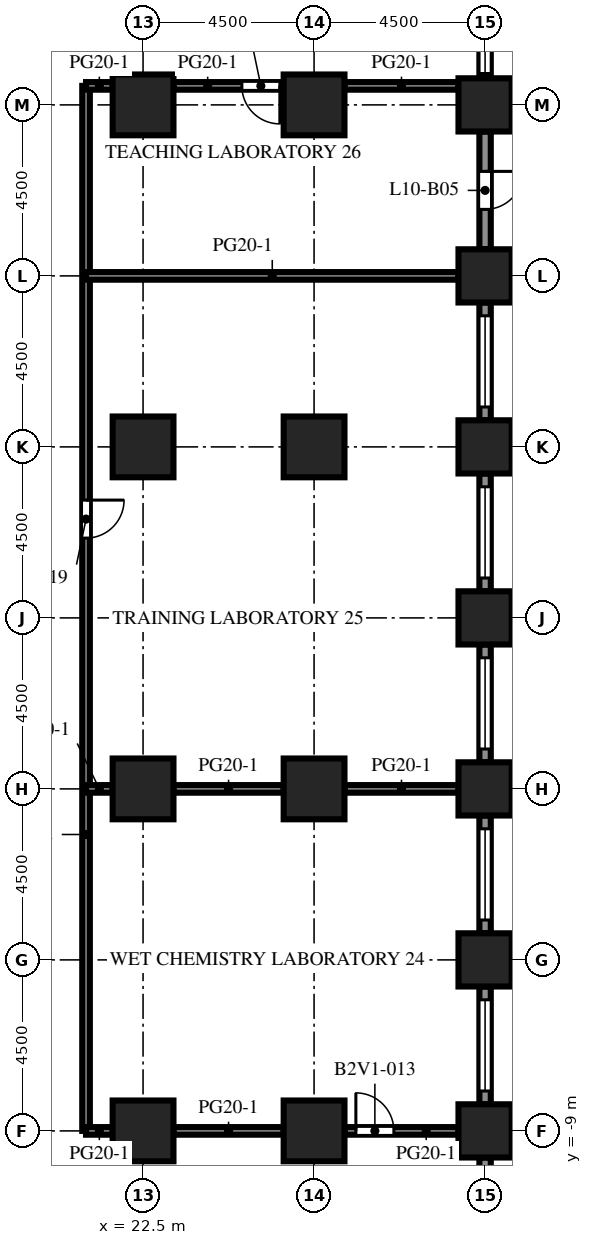
"""IFC4 building model, lengths in metres.
Left out: names, types, materials, properties, quantities, classifications, styles, units other than length and angle.
Written with IfcOpenShell. Run it as: python <this file> out.ifc"""

import sys

from ifc_helpers import new_model, si_unit, direction, frame, frame_2d, origin, origin_2d, place, context, subcontext, project, spatial, rectangle, extrude, element, fill, save


model = new_model("IFC4")
c1 = context("Model", 3, precision=1e-05, world=origin(), true_north=direction((0.0, 1.0)))
c2 = subcontext(c1, "Body", "Model", "MODEL_VIEW")
j1 = project(units=[si_unit("LENGTHUNIT", "METRE"), si_unit("PLANEANGLEUNIT", "RADIAN")], contexts=[c1])
p1 = place(None, origin())
s1 = spatial("IfcSite", under=j1, at=p1, CompositionType="ELEMENT")
p2 = place(p1, origin())
s2 = spatial("IfcBuilding", under=s1, at=p2, CompositionType="ELEMENT")
p3 = place(p2, frame((0.0, 0.0, 46.0)))
s3 = spatial("IfcBuildingStorey", under=s2, at=p3, CompositionType="ELEMENT", Elevation=46.0)
for number, where, z_axis, x_axis in (
    (1, (31.5, -9.0, 0.0), (0.0, 0.0, 1.0), (1.0, 0.0, 0.0)),
    (2, (31.5, -4.5, 0.0), (0.0, 0.0, 1.0), (1.0, 0.0, 0.0)),
    (3, (31.5, 0.0, 0.0), (0.0, 0.0, 1.0), (1.0, 0.0, 0.0)),
    (4, (31.5, 4.5, 0.0), (0.0, 0.0, 1.0), (1.0, 0.0, 0.0)),
    (5, (31.5, 9.0, 0.0), (0.0, 0.0, 1.0), (1.0, 0.0, 0.0)),
    (6, (31.5, 13.5, 0.0), (0.0, 0.0, 1.0), (1.0, 0.0, 0.0)),
    (7, (31.5, 18.0, 0.0), (0.0, 0.0, 1.0), (1.0, 0.0, 0.0)),
):
    element("IfcColumn", number, at=place(p3, frame(where, z_axis=z_axis, x_axis=x_axis)), inside=s3, PredefinedType="COLUMN", context=c2, shape_type="SweptSolid", body=[
        extrude(rectangle(XDim=1.4, YDim=1.4, at=origin_2d()), origin(), (0.0, 0.0, 1.0), 4.1),
    ])
for number, where, z_axis, x_axis in (
    (8, (22.5, -9.0, 0.0), (0.0, 0.0, 1.0), (1.0, 0.0, 0.0)),
    (9, (22.5, 0.0, 0.0), (0.0, 0.0, 1.0), (1.0, 0.0, 0.0)),
    (10, (22.5, 9.0, 0.0), (0.0, 0.0, 1.0), (1.0, 0.0, 0.0)),
    (11, (22.5, 18.0, 0.0), (0.0, 0.0, 1.0), (1.0, 0.0, 0.0)),
    (12, (27.0, -9.0, 0.0), (0.0, 0.0, 1.0), (1.0, 0.0, 0.0)),
    (13, (27.0, 0.0, 0.0), (0.0, 0.0, 1.0), (1.0, 0.0, 0.0)),
    (14, (27.0, 9.0, 0.0), (0.0, 0.0, 1.0), (1.0, 0.0, 0.0)),
    (15, (27.0, 18.0, 0.0), (0.0, 0.0, 1.0), (1.0, 0.0, 0.0)),
):
    element("IfcColumn", number, at=place(p3, frame(where, z_axis=z_axis, x_axis=x_axis)), inside=s3, PredefinedType="COLUMN", context=c2, shape_type="SweptSolid", body=[
        extrude(rectangle(XDim=1.6, YDim=1.6, at=origin_2d()), origin(), (0.0, 0.0, 1.0), 4.1),
    ])
p4 = place(p3, frame((31.5, -9.7, 0.0), z_axis=(0.0, 0.0, 1.0), x_axis=(0.0, -1.0, 0.0)))
e16 = element("IfcWall", 16, at=p4, inside=s3, PredefinedType="SOLIDWALL", context=c2, shape_type="SweptSolid", body=[
    extrude(rectangle(XDim=3.1, YDim=0.3, at=frame_2d((1.55, 0.0))), origin(), (0.0, 0.0, 1.0), 2.75),
])
p5 = place(p4, frame((0.475, 0.0, 0.8)))
e17 = element("IfcOpeningElement", 17, at=p5, cuts=e16, PredefinedType="OPENING", context=c2, shape_type="SweptSolid", body=[
    extrude(rectangle(XDim=1.2, YDim=1.7, at=frame_2d((0.6, 0.85))), frame((0.0, 0.16, 0.0), z_axis=(0.0, -1.0, 0.0), x_axis=(1.0, 0.0, 0.0)), (0.0, 0.0, 1.0), 0.32),
])
p6 = place(p3, frame((31.5, -5.2, 0.0), z_axis=(0.0, 0.0, 1.0), x_axis=(0.0, -1.0, 0.0)))
e18 = element("IfcWall", 18, at=p6, inside=s3, PredefinedType="SOLIDWALL", context=c2, shape_type="SweptSolid", body=[
    extrude(rectangle(XDim=3.1, YDim=0.3, at=frame_2d((1.55, 0.0))), origin(), (0.0, 0.0, 1.0), 2.75),
])
p7 = place(p6, frame((0.35, 0.0, 0.8)))
e19 = element("IfcOpeningElement", 19, at=p7, cuts=e18, PredefinedType="OPENING", context=c2, shape_type="SweptSolid", body=[
    extrude(rectangle(XDim=2.4, YDim=1.7, at=frame_2d((1.2, 0.85))), frame((0.0, 0.16, 0.0), z_axis=(0.0, -1.0, 0.0), x_axis=(1.0, 0.0, 0.0)), (0.0, 0.0, 1.0), 0.32),
])
p8 = place(p3, frame((31.5, -0.7, 0.0), z_axis=(0.0, 0.0, 1.0), x_axis=(0.0, -1.0, 0.0)))
e20 = element("IfcWall", 20, at=p8, inside=s3, PredefinedType="SOLIDWALL", context=c2, shape_type="SweptSolid", body=[
    extrude(rectangle(XDim=3.1, YDim=0.3, at=frame_2d((1.55, 0.0))), origin(), (0.0, 0.0, 1.0), 2.75),
])
p9 = place(p8, frame((0.35, 0.0, 0.8)))
e21 = element("IfcOpeningElement", 21, at=p9, cuts=e20, PredefinedType="OPENING", context=c2, shape_type="SweptSolid", body=[
    extrude(rectangle(XDim=2.4, YDim=1.7, at=frame_2d((1.2, 0.85))), frame((0.0, 0.16, 0.0), z_axis=(0.0, -1.0, 0.0), x_axis=(1.0, 0.0, 0.0)), (0.0, 0.0, 1.0), 0.32),
])
p10 = place(p3, frame((31.5, 3.8, 0.0), z_axis=(0.0, 0.0, 1.0), x_axis=(0.0, -1.0, 0.0)))
e22 = element("IfcWall", 22, at=p10, inside=s3, PredefinedType="SOLIDWALL", context=c2, shape_type="SweptSolid", body=[
    extrude(rectangle(XDim=3.1, YDim=0.3, at=frame_2d((1.55, 0.0))), origin(), (0.0, 0.0, 1.0), 2.75),
])
p11 = place(p10, frame((0.35, 0.0, 0.8)))
e23 = element("IfcOpeningElement", 23, at=p11, cuts=e22, PredefinedType="OPENING", context=c2, shape_type="SweptSolid", body=[
    extrude(rectangle(XDim=2.4, YDim=1.7, at=frame_2d((1.2, 0.85))), frame((0.0, 0.16, 0.0), z_axis=(0.0, -1.0, 0.0), x_axis=(1.0, 0.0, 0.0)), (0.0, 0.0, 1.0), 0.32),
])
p12 = place(p3, frame((31.5, 8.3, 0.0), z_axis=(0.0, 0.0, 1.0), x_axis=(0.0, -1.0, 0.0)))
e24 = element("IfcWall", 24, at=p12, inside=s3, PredefinedType="SOLIDWALL", context=c2, shape_type="SweptSolid", body=[
    extrude(rectangle(XDim=3.1, YDim=0.3, at=frame_2d((1.55, 0.0))), origin(), (0.0, 0.0, 1.0), 2.75),
])
p13 = place(p12, frame((0.35, 0.0, 0.8)))
e25 = element("IfcOpeningElement", 25, at=p13, cuts=e24, PredefinedType="OPENING", context=c2, shape_type="SweptSolid", body=[
    extrude(rectangle(XDim=2.4, YDim=1.7, at=frame_2d((1.2, 0.85))), frame((0.0, 0.16, 0.0), z_axis=(0.0, -1.0, 0.0), x_axis=(1.0, 0.0, 0.0)), (0.0, 0.0, 1.0), 0.32),
])
p14 = place(p3, frame((31.5, 12.8, 0.0), z_axis=(0.0, 0.0, 1.0), x_axis=(0.0, -1.0, 0.0)))
e26 = element("IfcWall", 26, at=p14, inside=s3, PredefinedType="SOLIDWALL", context=c2, shape_type="SweptSolid", body=[
    extrude(rectangle(XDim=3.1, YDim=0.3, at=frame_2d((1.55, 0.0))), origin(), (0.0, 0.0, 1.0), 2.75),
])
p15 = place(p14, frame((0.35, 0.0, 0.8)))
e27 = element("IfcOpeningElement", 27, at=p15, cuts=e26, PredefinedType="OPENING", context=c2, shape_type="SweptSolid", body=[
    extrude(rectangle(XDim=2.4, YDim=1.7, at=frame_2d((1.2, 0.85))), frame((0.0, 0.16, 0.0), z_axis=(0.0, -1.0, 0.0), x_axis=(1.0, 0.0, 0.0)), (0.0, 0.0, 1.0), 0.32),
])
p16 = place(p3, frame((31.5, 17.3, 0.0), z_axis=(0.0, 0.0, 1.0), x_axis=(0.0, -1.0, 0.0)))
e28 = element("IfcWall", 28, at=p16, inside=s3, PredefinedType="SOLIDWALL", context=c2, shape_type="SweptSolid", body=[
    extrude(rectangle(XDim=3.1, YDim=0.3, at=frame_2d((1.55, 0.0))), origin(), (0.0, 0.0, 1.0), 2.75),
])
p17 = place(p16, frame((1.05, 0.0, 0.0)))
e29 = element("IfcOpeningElement", 29, at=p17, cuts=e28, PredefinedType="OPENING", context=c2, shape_type="SweptSolid", body=[
    extrude(rectangle(XDim=1.0, YDim=2.2, at=frame_2d((0.5, 1.1))), frame((0.0, 0.16, 0.0), z_axis=(0.0, -1.0, 0.0), x_axis=(1.0, 0.0, 0.0)), (0.0, 0.0, 1.0), 0.32),
])
p18 = place(p3, frame((31.5, 21.8, 0.0), z_axis=(0.0, 0.0, 1.0), x_axis=(0.0, -1.0, 0.0)))
e30 = element("IfcWall", 30, at=p18, inside=s3, PredefinedType="SOLIDWALL", context=c2, shape_type="SweptSolid", body=[
    extrude(rectangle(XDim=3.1, YDim=0.3, at=frame_2d((1.55, 0.0))), origin(), (0.0, 0.0, 1.0), 2.75),
])
p19 = place(p18, frame((0.575, 0.0, 0.8)))
e31 = element("IfcOpeningElement", 31, at=p19, cuts=e30, PredefinedType="OPENING", context=c2, shape_type="SweptSolid", body=[
    extrude(rectangle(XDim=2.4, YDim=1.7, at=frame_2d((1.2, 0.85))), frame((0.0, 0.16, 0.0), z_axis=(0.0, -1.0, 0.0), x_axis=(1.0, 0.0, 0.0)), (0.0, 0.0, 1.0), 0.32),
])
p20 = place(p3, frame((21.0, 18.5, 0.0), z_axis=(0.0, 0.0, 1.0), x_axis=(0.0, -1.0, 0.0)))
e32 = element("IfcWall", 32, at=p20, inside=s3, PredefinedType="PARTITIONING", context=c2, shape_type="SweptSolid", body=[
    extrude(rectangle(XDim=27.5, YDim=0.2, at=frame_2d((13.75, 0.0))), origin(), (0.0, 0.0, 1.0), 3.65),
])
p21 = place(p20, frame((10.9, 0.0, 0.0)))
e33 = element("IfcOpeningElement", 33, at=p21, cuts=e32, PredefinedType="OPENING", context=c2, shape_type="SweptSolid", body=[
    extrude(rectangle(XDim=1.0, YDim=2.1, at=frame_2d((0.5, 1.05))), frame((0.0, 0.11, 0.0), z_axis=(0.0, -1.0, 0.0), x_axis=(1.0, 0.0, 0.0)), (0.0, 0.0, 1.0), 0.22),
])
p22 = place(p3, frame((21.0, -9.0, 0.0), z_axis=(0.0, 0.0, 1.0), x_axis=(1.0, 0.0, 0.0)))
e34 = element("IfcWall", 34, at=p22, inside=s3, PredefinedType="PARTITIONING", context=c2, shape_type="SweptSolid", body=[
    extrude(rectangle(XDim=0.7, YDim=0.2, at=frame_2d((0.35, 0.0))), origin(), (0.0, 0.0, 1.0), 3.65),
])
p23 = place(p3, frame((23.3, -9.0, 0.0), z_axis=(0.0, 0.0, 1.0), x_axis=(1.0, 0.0, 0.0)))
e35 = element("IfcWall", 35, at=p23, inside=s3, PredefinedType="PARTITIONING", context=c2, shape_type="SweptSolid", body=[
    extrude(rectangle(XDim=2.9, YDim=0.2, at=frame_2d((1.45, 0.0))), origin(), (0.0, 0.0, 1.0), 3.65),
])
p24 = place(p3, frame((27.8, -9.0, 0.0), z_axis=(0.0, 0.0, 1.0), x_axis=(1.0, 0.0, 0.0)))
e36 = element("IfcWall", 36, at=p24, inside=s3, PredefinedType="PARTITIONING", context=c2, shape_type="SweptSolid", body=[
    extrude(rectangle(XDim=3.0, YDim=0.2, at=frame_2d((1.5, 0.0))), origin(), (0.0, 0.0, 1.0), 3.65),
])
p25 = place(p24, frame((0.3, 0.0, 0.0)))
e37 = element("IfcOpeningElement", 37, at=p25, cuts=e36, PredefinedType="OPENING", context=c2, shape_type="SweptSolid", body=[
    extrude(rectangle(XDim=1.0, YDim=2.1, at=frame_2d((0.5, 1.05))), frame((0.0, 0.11, 0.0), z_axis=(0.0, -1.0, 0.0), x_axis=(1.0, 0.0, 0.0)), (0.0, 0.0, 1.0), 0.22),
])
p26 = place(p3, frame((21.0, 0.0, 0.0), z_axis=(0.0, 0.0, 1.0), x_axis=(1.0, 0.0, 0.0)))
e38 = element("IfcWall", 38, at=p26, inside=s3, PredefinedType="PARTITIONING", context=c2, shape_type="SweptSolid", body=[
    extrude(rectangle(XDim=0.7, YDim=0.2, at=frame_2d((0.35, 0.0))), origin(), (0.0, 0.0, 1.0), 3.65),
])
p27 = place(p3, frame((23.3, 0.0, 0.0), z_axis=(0.0, 0.0, 1.0), x_axis=(1.0, 0.0, 0.0)))
e39 = element("IfcWall", 39, at=p27, inside=s3, PredefinedType="PARTITIONING", context=c2, shape_type="SweptSolid", body=[
    extrude(rectangle(XDim=2.9, YDim=0.2, at=frame_2d((1.45, 0.0))), origin(), (0.0, 0.0, 1.0), 3.65),
])
p28 = place(p3, frame((27.8, 0.0, 0.0), z_axis=(0.0, 0.0, 1.0), x_axis=(1.0, 0.0, 0.0)))
e40 = element("IfcWall", 40, at=p28, inside=s3, PredefinedType="PARTITIONING", context=c2, shape_type="SweptSolid", body=[
    extrude(rectangle(XDim=3.0, YDim=0.2, at=frame_2d((1.5, 0.0))), origin(), (0.0, 0.0, 1.0), 3.65),
])
p29 = place(p3, frame((21.0, 13.5, 0.0), z_axis=(0.0, 0.0, 1.0), x_axis=(1.0, 0.0, 0.0)))
e41 = element("IfcWall", 41, at=p29, inside=s3, PredefinedType="PARTITIONING", context=c2, shape_type="SweptSolid", body=[
    extrude(rectangle(XDim=9.8, YDim=0.2, at=frame_2d((4.9, 0.0))), origin(), (0.0, 0.0, 1.0), 3.65),
])
p30 = place(p3, frame((21.0, 18.5, 0.0), z_axis=(0.0, 0.0, 1.0), x_axis=(1.0, 0.0, 0.0)))
e42 = element("IfcWall", 42, at=p30, inside=s3, PredefinedType="PARTITIONING", context=c2, shape_type="SweptSolid", body=[
    extrude(rectangle(XDim=0.7, YDim=0.2, at=frame_2d((0.35, 0.0))), origin(), (0.0, 0.0, 1.0), 3.65),
])
p31 = place(p3, frame((26.2, 18.5, 0.0), z_axis=(0.0, 0.0, 1.0), x_axis=(-1.0, 0.0, 0.0)))
e43 = element("IfcWall", 43, at=p31, inside=s3, PredefinedType="PARTITIONING", context=c2, shape_type="SweptSolid", body=[
    extrude(rectangle(XDim=2.9, YDim=0.2, at=frame_2d((1.45, 0.0))), origin(), (0.0, 0.0, 1.0), 3.65),
])
p32 = place(p31, frame((0.1, 0.0, 0.0)))
e44 = element("IfcOpeningElement", 44, at=p32, cuts=e43, PredefinedType="OPENING", context=c2, shape_type="SweptSolid", body=[
    extrude(rectangle(XDim=1.0, YDim=2.1, at=frame_2d((0.5, 1.05))), frame((0.0, 0.11, 0.0), z_axis=(0.0, -1.0, 0.0), x_axis=(1.0, 0.0, 0.0)), (0.0, 0.0, 1.0), 0.22),
])
p33 = place(p3, frame((27.8, 18.5, 0.0), z_axis=(0.0, 0.0, 1.0), x_axis=(1.0, 0.0, 0.0)))
e45 = element("IfcWall", 45, at=p33, inside=s3, PredefinedType="PARTITIONING", context=c2, shape_type="SweptSolid", body=[
    extrude(rectangle(XDim=3.0, YDim=0.2, at=frame_2d((1.5, 0.0))), origin(), (0.0, 0.0, 1.0), 3.65),
])
p34 = place(p7, origin())
e46 = element("IfcWindow", 46, at=p34, inside=s3, PartitioningType="SINGLE_PANEL", PredefinedType="WINDOW", context=c2, shape_type="SweptSolid", body=[
    extrude(rectangle(XDim=2.4, YDim=1.7, at=frame_2d((1.2, 0.85))), frame((0.0, 0.03, 0.0), z_axis=(0.0, -1.0, 0.0), x_axis=(1.0, 0.0, 0.0)), (0.0, 0.0, 1.0), 0.06),
])
fill(e19, e46)
p35 = place(p9, origin())
e47 = element("IfcWindow", 47, at=p35, inside=s3, PartitioningType="SINGLE_PANEL", PredefinedType="WINDOW", context=c2, shape_type="SweptSolid", body=[
    extrude(rectangle(XDim=2.4, YDim=1.7, at=frame_2d((1.2, 0.85))), frame((0.0, 0.03, 0.0), z_axis=(0.0, -1.0, 0.0), x_axis=(1.0, 0.0, 0.0)), (0.0, 0.0, 1.0), 0.06),
])
fill(e21, e47)
p36 = place(p11, origin())
e48 = element("IfcWindow", 48, at=p36, inside=s3, PartitioningType="SINGLE_PANEL", PredefinedType="WINDOW", context=c2, shape_type="SweptSolid", body=[
    extrude(rectangle(XDim=2.4, YDim=1.7, at=frame_2d((1.2, 0.85))), frame((0.0, 0.03, 0.0), z_axis=(0.0, -1.0, 0.0), x_axis=(1.0, 0.0, 0.0)), (0.0, 0.0, 1.0), 0.06),
])
fill(e23, e48)
p37 = place(p13, origin())
e49 = element("IfcWindow", 49, at=p37, inside=s3, PartitioningType="SINGLE_PANEL", PredefinedType="WINDOW", context=c2, shape_type="SweptSolid", body=[
    extrude(rectangle(XDim=2.4, YDim=1.7, at=frame_2d((1.2, 0.85))), frame((0.0, 0.03, 0.0), z_axis=(0.0, -1.0, 0.0), x_axis=(1.0, 0.0, 0.0)), (0.0, 0.0, 1.0), 0.06),
])
fill(e25, e49)
p38 = place(p15, origin())
e50 = element("IfcWindow", 50, at=p38, inside=s3, PartitioningType="SINGLE_PANEL", PredefinedType="WINDOW", context=c2, shape_type="SweptSolid", body=[
    extrude(rectangle(XDim=2.4, YDim=1.7, at=frame_2d((1.2, 0.85))), frame((0.0, 0.03, 0.0), z_axis=(0.0, -1.0, 0.0), x_axis=(1.0, 0.0, 0.0)), (0.0, 0.0, 1.0), 0.06),
])
fill(e27, e50)
p39 = place(p17, origin())
e51 = element("IfcDoor", 51, at=p39, inside=s3, OperationType="SINGLE_SWING_LEFT", PredefinedType="DOOR", context=c2, shape_type="SweptSolid", body=[
    extrude(rectangle(XDim=1.0, YDim=2.2, at=frame_2d((0.5, 1.1))), frame((0.0, 0.025, 0.0), z_axis=(0.0, -1.0, 0.0), x_axis=(1.0, 0.0, 0.0)), (0.0, 0.0, 1.0), 0.05),
])
fill(e29, e51)
p40 = place(p19, origin())
e52 = element("IfcWindow", 52, at=p40, inside=s3, PartitioningType="SINGLE_PANEL", PredefinedType="WINDOW", context=c2, shape_type="SweptSolid", body=[
    extrude(rectangle(XDim=2.4, YDim=1.7, at=frame_2d((1.2, 0.85))), frame((0.0, 0.03, 0.0), z_axis=(0.0, -1.0, 0.0), x_axis=(1.0, 0.0, 0.0)), (0.0, 0.0, 1.0), 0.06),
])
fill(e31, e52)
p41 = place(p25, origin())
e53 = element("IfcDoor", 53, at=p41, inside=s3, OperationType="SINGLE_SWING_LEFT", PredefinedType="DOOR", context=c2, shape_type="SweptSolid", body=[
    extrude(rectangle(XDim=1.0, YDim=2.1, at=frame_2d((0.5, 1.05))), frame((0.0, 0.025, 0.0), z_axis=(0.0, -1.0, 0.0), x_axis=(1.0, 0.0, 0.0)), (0.0, 0.0, 1.0), 0.05),
])
fill(e37, e53)
p42 = place(p32, origin())
e54 = element("IfcDoor", 54, at=p42, inside=s3, OperationType="SINGLE_SWING_LEFT", PredefinedType="DOOR", context=c2, shape_type="SweptSolid", body=[
    extrude(rectangle(XDim=1.0, YDim=2.1, at=frame_2d((0.5, 1.05))), frame((0.0, 0.025, 0.0), z_axis=(0.0, -1.0, 0.0), x_axis=(1.0, 0.0, 0.0)), (0.0, 0.0, 1.0), 0.05),
])
fill(e44, e54)
p43 = place(p21, origin())
e55 = element("IfcDoor", 55, at=p43, inside=s3, OperationType="SINGLE_SWING_LEFT", PredefinedType="DOOR", context=c2, shape_type="SweptSolid", body=[
    extrude(rectangle(XDim=1.0, YDim=2.1, at=frame_2d((0.5, 1.05))), frame((0.0, 0.025, 0.0), z_axis=(0.0, -1.0, 0.0), x_axis=(1.0, 0.0, 0.0)), (0.0, 0.0, 1.0), 0.05),
])
fill(e33, e55)
save(model, sys.argv[1])
